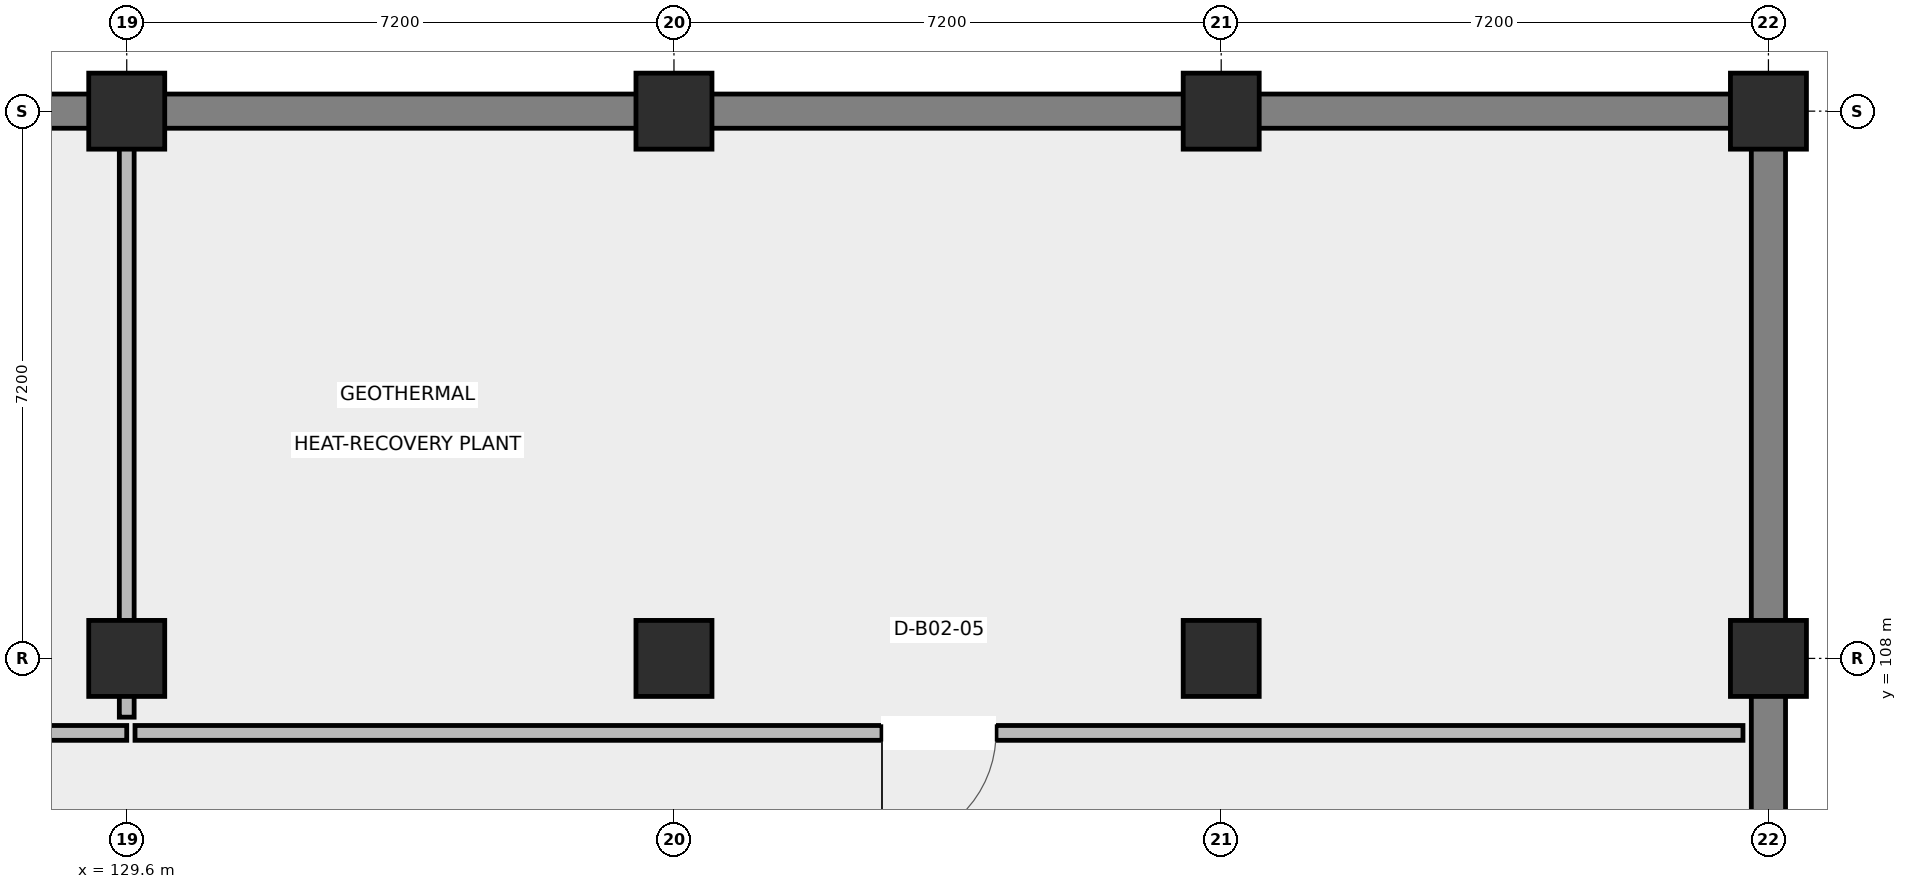
"""IFC4 building model, lengths in metres.
Left out: names, types, materials, properties, quantities, classifications, styles, units other than length and angle.
Written with IfcOpenShell. Run it as: python <this file> out.ifc"""

import sys

from ifc_helpers import new_model, si_unit, direction, frame, frame_2d, origin, origin_2d, place, context, subcontext, project, spatial, rectangle, extrude, element, fill, save


model = new_model("IFC4")
c1 = context("Model", 3, precision=1e-05, world=origin(), true_north=direction((0.0, 1.0)))
c2 = subcontext(c1, "Body", "Model", "MODEL_VIEW")
j1 = project(units=[si_unit("LENGTHUNIT", "METRE"), si_unit("PLANEANGLEUNIT", "RADIAN")], contexts=[c1])
p1 = place(None, origin())
s1 = spatial("IfcSite", under=j1, at=p1, CompositionType="ELEMENT")
p2 = place(p1, origin())
s2 = spatial("IfcBuilding", under=s1, at=p2, CompositionType="ELEMENT")
p3 = place(p2, frame((0.0, 0.0, -9.0)))
s3 = spatial("IfcBuildingStorey", under=s2, at=p3, CompositionType="ELEMENT", Elevation=-9.0)
for number, where, z_axis, x_axis in (
    (1, (129.6, 108.0, 0.0), (0.0, 0.0, 1.0), (1.0, 0.0, 0.0)),
    (2, (129.6, 115.2, 0.0), (0.0, 0.0, 1.0), (1.0, 0.0, 0.0)),
    (3, (136.8, 108.0, 0.0), (0.0, 0.0, 1.0), (1.0, 0.0, 0.0)),
    (4, (136.8, 115.2, 0.0), (0.0, 0.0, 1.0), (1.0, 0.0, 0.0)),
    (5, (144.0, 108.0, 0.0), (0.0, 0.0, 1.0), (1.0, 0.0, 0.0)),
    (6, (144.0, 115.2, 0.0), (0.0, 0.0, 1.0), (1.0, 0.0, 0.0)),
    (7, (151.2, 108.0, 0.0), (0.0, 0.0, 1.0), (1.0, 0.0, 0.0)),
    (8, (151.2, 115.2, 0.0), (0.0, 0.0, 1.0), (1.0, 0.0, 0.0)),
):
    element("IfcColumn", number, at=place(p3, frame(where, z_axis=z_axis, x_axis=x_axis)), inside=s3, PredefinedType="COLUMN", context=c2, shape_type="SweptSolid", body=[
        extrude(rectangle(XDim=1.0, YDim=1.0, at=origin_2d()), origin(), (0.0, 0.0, 1.0), 4.15),
    ])
p4 = place(p3, frame((151.2, 93.6, 0.0), z_axis=(0.0, 0.0, 1.0), x_axis=(0.0, 1.0, 0.0)))
e9 = element("IfcWall", 9, at=p4, inside=s3, PredefinedType="SOLIDWALL", context=c2, shape_type="SweptSolid", body=[
    extrude(rectangle(XDim=21.6, YDim=0.45, at=frame_2d((10.8, 0.0))), origin(), (0.0, 0.0, 1.0), 4.15),
])
p5 = place(p3, frame((151.2, 115.2, 0.0), z_axis=(0.0, 0.0, 1.0), x_axis=(-1.0, 0.0, 0.0)))
e10 = element("IfcWall", 10, at=p5, inside=s3, PredefinedType="SOLIDWALL", context=c2, shape_type="SweptSolid", body=[
    extrude(rectangle(XDim=64.8, YDim=0.45, at=frame_2d((32.4, 0.0))), origin(), (0.0, 0.0, 1.0), 4.15),
])
p6 = place(p3, frame((129.6, 107.02, 0.0), z_axis=(0.0, 0.0, 1.0), x_axis=(-1.0, 0.0, 0.0)))
e11 = element("IfcWall", 11, at=p6, inside=s3, PredefinedType="PARTITIONING", context=c2, shape_type="SweptSolid", body=[
    extrude(rectangle(XDim=21.491, YDim=0.195, at=frame_2d((10.746, 0.0))), origin(), (0.0, 0.0, 1.0), 3.19),
])
p7 = place(p6, frame((9.921, 0.0, 0.0)))
e12 = element("IfcOpeningElement", 12, at=p7, cuts=e11, PredefinedType="OPENING", context=c2, shape_type="SweptSolid", body=[
    extrude(rectangle(XDim=1.65, YDim=2.2, at=frame_2d((0.825, 1.1))), frame((0.0, 0.107, 0.0), z_axis=(0.0, -1.0, 0.0), x_axis=(1.0, 0.0, 0.0)), (0.0, 0.0, 1.0), 0.215),
])
p8 = place(p3, frame((129.6, 114.866, 0.0), z_axis=(0.0, 0.0, 1.0), x_axis=(0.0, -1.0, 0.0)))
e13 = element("IfcWall", 13, at=p8, inside=s3, PredefinedType="PARTITIONING", context=c2, shape_type="SweptSolid", body=[
    extrude(rectangle(XDim=7.639, YDim=0.195, at=frame_2d((3.819, 0.0))), origin(), (0.0, 0.0, 1.0), 3.19),
])
p9 = place(p3, frame((150.865, 107.02, 0.0), z_axis=(0.0, 0.0, 1.0), x_axis=(-1.0, 0.0, 0.0)))
e14 = element("IfcWall", 14, at=p9, inside=s3, PredefinedType="PARTITIONING", context=c2, shape_type="SweptSolid", body=[
    extrude(rectangle(XDim=21.156, YDim=0.195, at=frame_2d((10.578, 0.0))), origin(), (0.0, 0.0, 1.0), 3.19),
])
p10 = place(p9, frame((9.828, 0.0, 0.0)))
e15 = element("IfcOpeningElement", 15, at=p10, cuts=e14, PredefinedType="OPENING", context=c2, shape_type="SweptSolid", body=[
    extrude(rectangle(XDim=1.5, YDim=2.15, at=frame_2d((0.75, 1.075))), frame((0.0, 0.107, 0.0), z_axis=(0.0, -1.0, 0.0), x_axis=(1.0, 0.0, 0.0)), (0.0, 0.0, 1.0), 0.215),
])
p11 = place(p10, origin())
e16 = element("IfcDoor", 16, at=p11, inside=s3, OperationType="SINGLE_SWING_RIGHT", PredefinedType="DOOR", context=c2, shape_type="SweptSolid", body=[
    extrude(rectangle(XDim=1.5, YDim=2.15, at=frame_2d((0.75, 1.075))), frame((0.0, 0.025, 0.0), z_axis=(0.0, -1.0, 0.0), x_axis=(1.0, 0.0, 0.0)), (0.0, 0.0, 1.0), 0.05),
])
fill(e15, e16)
save(model, sys.argv[1])
